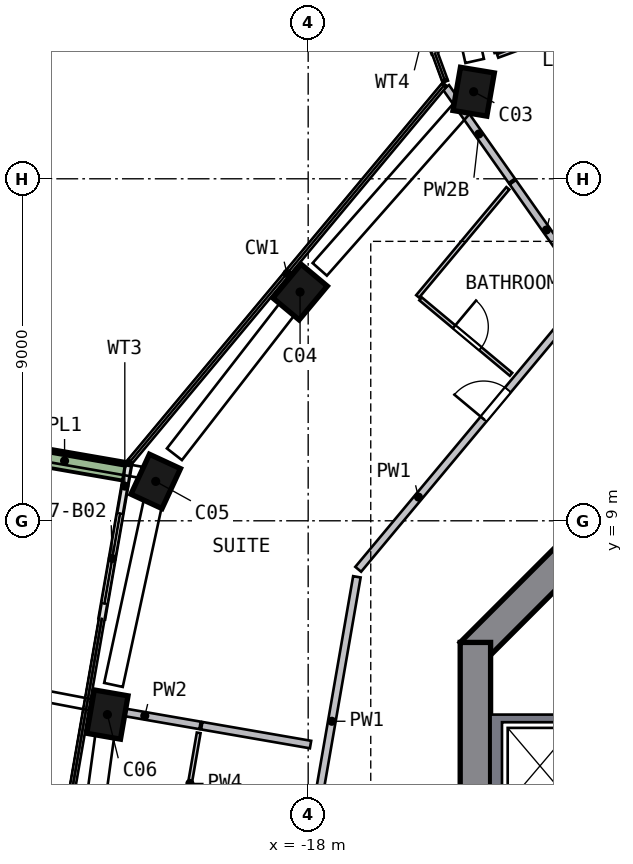
"""IFC4 building model, lengths in metres.
Left out: names, types, materials, properties, quantities, classifications, styles, units other than length and angle.
Written with IfcOpenShell. Run it as: python <this file> out.ifc"""

import sys

from ifc_helpers import new_model, si_unit, direction, frame, frame_2d, origin, origin_2d, place, context, subcontext, project, spatial, polyline, rectangle, outline, extrude, element, fill, save


model = new_model("IFC4")
c1 = context("Model", 3, precision=1e-05, world=origin(), true_north=direction((0.0, 1.0)))
c2 = subcontext(c1, "Body", "Model", "MODEL_VIEW")
j1 = project(units=[si_unit("LENGTHUNIT", "METRE"), si_unit("PLANEANGLEUNIT", "RADIAN")], contexts=[c1])
p1 = place(None, origin())
s1 = spatial("IfcSite", under=j1, at=p1, CompositionType="ELEMENT")
p2 = place(p1, origin())
s2 = spatial("IfcBuilding", under=s1, at=p2, CompositionType="ELEMENT")
p3 = place(p2, frame((0.0, 0.0, 115.0)))
s3 = spatial("IfcBuildingStorey", under=s2, at=p3, CompositionType="ELEMENT", Elevation=115.0)
p4 = place(p3, frame((-13.529, 20.37, 0.0), z_axis=(-0.0963115, -0.06514519, 0.993217096), x_axis=(0.163605987, 0.983247674, 0.080356042)))
e1 = element("IfcColumn", 1, at=p4, inside=s3, PredefinedType="COLUMN", context=c2, shape_type="SweptSolid", body=[
    extrude(rectangle(XDim=1.15, YDim=0.9, at=origin_2d()), origin(), (0.0, 0.0, 1.0), 3.212),
])
p5 = place(p3, frame((-18.127, 15.125, 0.0), z_axis=(-0.071258876, -0.086849132, 0.993669664), x_axis=(-0.636786768, -0.7628125, -0.112337447)))
e2 = element("IfcColumn", 2, at=p5, inside=s3, PredefinedType="COLUMN", context=c2, shape_type="SweptSolid", body=[
    extrude(rectangle(XDim=1.15, YDim=0.9, at=origin_2d()), origin(), (0.0, 0.0, 1.0), 3.21),
])
p6 = place(p3, frame((-21.955, 10.163, 0.0), z_axis=(-0.047440282, -0.104839983, 0.993356934), x_axis=(0.417189371, 0.90150539, 0.115069807)))
e3 = element("IfcColumn", 3, at=p6, inside=s3, PredefinedType="COLUMN", context=c2, shape_type="SweptSolid", body=[
    extrude(rectangle(XDim=1.15, YDim=0.9, at=origin_2d()), origin(), (0.0, 0.0, 1.0), 3.211),
])
p7 = place(p3, frame((-23.261, 4.035, 0.0), z_axis=(-0.018252096, -0.11080543, 0.993674503), x_axis=(-0.169817412, -0.979056669, -0.112294638)))
e4 = element("IfcColumn", 4, at=p7, inside=s3, PredefinedType="COLUMN", context=c2, shape_type="SweptSolid", body=[
    extrude(rectangle(XDim=1.15, YDim=0.9, at=origin_2d()), origin(), (0.0, 0.0, 1.0), 3.21),
])
p8 = place(p3, frame((-5.516, 13.717, 0.0), z_axis=(0.0, 0.0, 1.0), x_axis=(-0.707106781, -0.707106781, 0.0)))
e5 = element("IfcWall", 5, at=p8, inside=s3, PredefinedType="SHEAR", context=c2, shape_type="SweptSolid", body=[
    extrude(rectangle(XDim=11.598, YDim=0.8, at=frame_2d((5.799, 0.0))), origin(), (0.0, 0.0, 1.0), 3.5),
])
p9 = place(p3, frame((-13.6, 5.799, 0.0), z_axis=(0.0, 0.0, 1.0), x_axis=(0.0, -1.0, 0.0)))
e6 = element("IfcWall", 6, at=p9, inside=s3, PredefinedType="SHEAR", context=c2, shape_type="SweptSolid", body=[
    extrude(rectangle(XDim=11.598, YDim=0.8, at=frame_2d((5.799, 0.0))), origin(), (0.0, 0.0, 1.0), 3.5),
])
p10 = place(p9, frame((4.899, 0.0, 0.0)))
e7 = element("IfcOpeningElement", 7, at=p10, cuts=e6, PredefinedType="OPENING", context=c2, shape_type="SweptSolid", body=[
    extrude(rectangle(XDim=1.8, YDim=2.1, at=frame_2d((0.9, 1.05))), frame((0.0, 0.41, 0.0), z_axis=(0.0, -1.0, 0.0), x_axis=(1.0, 0.0, 0.0)), (0.0, 0.0, 1.0), 0.82),
])
p11 = place(p3, frame((-15.177, 22.698, 0.0), z_axis=(0.0, 0.0, 1.0), x_axis=(0.344671943, -0.938723203, 0.0)))
e8 = element("IfcWall", 8, at=p11, inside=s3, PredefinedType="SOLIDWALL", context=c2, shape_type="SweptSolid", body=[
    extrude(rectangle(XDim=1.478, YDim=0.15, at=frame_2d((0.739, 0.0))), origin(), (0.0, 0.0, 1.0), 2.425),
])
p12 = place(p3, frame((-22.734, 10.438, 0.0), z_axis=(0.0, 0.0, 1.0), x_axis=(-0.170877623, -0.98529226, 0.0)))
e9 = element("IfcWall", 9, at=p12, inside=s3, PredefinedType="SOLIDWALL", context=c2, shape_type="SweptSolid", body=[
    extrude(rectangle(XDim=4.068, YDim=0.15, at=frame_2d((2.034, 0.0))), origin(), (0.0, 0.0, 1.0), 2.425),
])
p13 = place(p12, frame((1.268, 0.0, 0.0)))
e10 = element("IfcOpeningElement", 10, at=p13, cuts=e9, PredefinedType="OPENING", context=c2, shape_type="SweptSolid", body=[
    extrude(rectangle(XDim=2.4, YDim=2.4, at=frame_2d((1.2, 1.2))), frame((0.0, 0.085, 0.0), z_axis=(0.0, -1.0, 0.0), x_axis=(1.0, 0.0, 0.0)), (0.0, 0.0, 1.0), 0.17),
])
p14 = place(p3, frame((-22.834, 10.304, 0.0), z_axis=(0.0, 0.0, 1.0), x_axis=(-0.985293977, 0.170867726, 0.0)))
e11 = element("IfcWall", 11, at=p14, inside=s3, PredefinedType="SOLIDWALL", context=c2, shape_type="SweptSolid", body=[
    extrude(rectangle(XDim=3.199, YDim=0.5, at=frame_2d((1.6, 0.0))), origin(), (0.0, 0.0, 1.0), 0.7),
])
p15 = place(p3, origin())
e12 = element("IfcWall", 12, at=p15, inside=s3, PredefinedType="SOLIDWALL", context=c2, shape_type="SweptSolid", body=[
    extrude(outline(polyline([(-13.2, 3.9), (-10.9, 3.9), (-10.9, 3.7), (-12.9, 3.7), (-12.9, 1.4), (-10.9, 1.4), (-10.9, 1.2), (-13.2, 1.2), (-13.2, 3.9)])), origin(), (0.0, 0.0, 1.0), 3.19),
])
p16 = place(p3, frame((-18.276, -1.456, 0.0), z_axis=(0.0, 0.0, 1.0), x_axis=(0.170875476, 0.985292633, 0.0)))
e13 = element("IfcWall", 13, at=p16, inside=s3, PredefinedType="SOLIDWALL", context=c2, shape_type="SweptSolid", body=[
    extrude(rectangle(XDim=9.115, YDim=0.2, at=frame_2d((4.558, 0.0))), origin(), (0.0, 0.0, 1.0), 3.19),
])
p17 = place(p16, frame((0.2, 0.0, 0.0)))
e14 = element("IfcOpeningElement", 14, at=p17, cuts=e13, PredefinedType="OPENING", context=c2, shape_type="SweptSolid", body=[
    extrude(rectangle(XDim=1.0, YDim=2.1, at=frame_2d((0.5, 1.05))), frame((0.0, 0.11, 0.0), z_axis=(0.0, -1.0, 0.0), x_axis=(1.0, 0.0, 0.0)), (0.0, 0.0, 1.0), 0.22),
])
p18 = place(p3, frame((-16.684, 7.724, 0.0), z_axis=(0.0, 0.0, 1.0), x_axis=(0.640650848, 0.767832332, 0.0)))
e15 = element("IfcWall", 15, at=p18, inside=s3, PredefinedType="SOLIDWALL", context=c2, shape_type="SweptSolid", body=[
    extrude(rectangle(XDim=9.316, YDim=0.2, at=frame_2d((4.658, 0.0))), origin(), (0.0, 0.0, 1.0), 3.19),
])
p19 = place(p18, frame((5.15, 0.0, 0.0)))
e16 = element("IfcOpeningElement", 16, at=p19, cuts=e15, PredefinedType="OPENING", context=c2, shape_type="SweptSolid", body=[
    extrude(rectangle(XDim=1.0, YDim=2.1, at=frame_2d((0.5, 1.05))), frame((0.0, 0.11, 0.0), z_axis=(0.0, -1.0, 0.0), x_axis=(1.0, 0.0, 0.0)), (0.0, 0.0, 1.0), 0.22),
])
p20 = place(p3, frame((-20.845, 3.615, 0.0), z_axis=(0.0, 0.0, 1.0), x_axis=(-0.985279058, 0.170953732, 0.0)))
e17 = element("IfcWall", 17, at=p20, inside=s3, PredefinedType="SOLIDWALL", context=c2, shape_type="SweptSolid", body=[
    extrude(rectangle(XDim=2.952, YDim=0.2, at=frame_2d((1.476, 0.0))), origin(), (0.0, 0.0, 1.0), 3.19),
])
p21 = place(p3, frame((-17.938, 3.111, 0.0), z_axis=(0.0, 0.0, 1.0), x_axis=(-0.985293685, 0.170869407, 0.0)))
e18 = element("IfcWall", 18, at=p21, inside=s3, PredefinedType="SOLIDWALL", context=c2, shape_type="SweptSolid", body=[
    extrude(rectangle(XDim=2.905, YDim=0.2, at=frame_2d((1.452, 0.0))), origin(), (0.0, 0.0, 1.0), 3.19),
])
p22 = place(p3, frame((-12.642, 17.947, 0.0), z_axis=(0.0, 0.0, 1.0), x_axis=(-0.575919056, 0.817506723, 0.0)))
e19 = element("IfcWall", 19, at=p22, inside=s3, PredefinedType="SOLIDWALL", context=c2, shape_type="SweptSolid", body=[
    extrude(rectangle(XDim=3.011, YDim=0.2, at=frame_2d((1.506, 0.0))), origin(), (0.0, 0.0, 1.0), 2.69),
])
p23 = place(p3, frame((-10.844, 15.396, 0.0), z_axis=(0.0, 0.0, 1.0), x_axis=(-0.575863088, 0.817546148, 0.0)))
e20 = element("IfcWall", 20, at=p23, inside=s3, PredefinedType="SOLIDWALL", context=c2, shape_type="SweptSolid", body=[
    extrude(rectangle(XDim=3.075, YDim=0.2, at=frame_2d((1.538, 0.0))), origin(), (0.0, 0.0, 1.0), 3.19),
])
p24 = place(p3, frame((-21.343, 0.759, 0.0), z_axis=(0.0, 0.0, 1.0), x_axis=(0.170993898, 0.985272088, 0.0)))
e21 = element("IfcWall", 21, at=p24, inside=s3, PredefinedType="PARTITIONING", context=c2, shape_type="SweptSolid", body=[
    extrude(rectangle(XDim=2.7, YDim=0.1, at=frame_2d((1.35, 0.0))), origin(), (0.0, 0.0, 1.0), 3.19),
])
p25 = place(p3, frame((-15.12, 14.905, 0.0), z_axis=(0.0, 0.0, 1.0), x_axis=(0.640638089, 0.767842978, 0.0)))
e22 = element("IfcWall", 22, at=p25, inside=s3, PredefinedType="PARTITIONING", context=c2, shape_type="SweptSolid", body=[
    extrude(rectangle(XDim=3.704, YDim=0.1, at=frame_2d((1.852, 0.0))), origin(), (0.0, 0.0, 1.0), 3.19),
])
p26 = place(p3, frame((-15.043, 14.841, 0.0), z_axis=(0.0, 0.0, 1.0), x_axis=(0.767833833, -0.64064905, 0.0)))
e23 = element("IfcWall", 23, at=p26, inside=s3, PredefinedType="PARTITIONING", context=c2, shape_type="SweptSolid", body=[
    extrude(rectangle(XDim=3.1, YDim=0.1, at=frame_2d((1.55, 0.0))), origin(), (0.0, 0.0, 1.0), 3.19),
])
p27 = place(p26, frame((1.15, 0.0, 0.0)))
e24 = element("IfcOpeningElement", 24, at=p27, cuts=e23, PredefinedType="OPENING", context=c2, shape_type="SweptSolid", body=[
    extrude(rectangle(XDim=0.9, YDim=2.1, at=frame_2d((0.45, 1.05))), frame((0.0, 0.06, 0.0), z_axis=(0.0, -1.0, 0.0), x_axis=(1.0, 0.0, 0.0)), (0.0, 0.0, 1.0), 0.12),
])
p28 = place(p3, frame((-13.05, 21.327, 0.0), z_axis=(0.0, 0.0, 1.0), x_axis=(-0.344662518, 0.938726663, 0.0)))
e25 = element("IfcWall", 25, at=p28, inside=s3, PredefinedType="PARTITIONING", context=c2, shape_type="SweptSolid", body=[
    extrude(rectangle(XDim=2.55, YDim=0.1, at=frame_2d((1.275, 0.0))), origin(), (0.0, 0.0, 1.0), 3.19),
])
p29 = place(p3, frame((-13.015, 21.233, 0.0), z_axis=(0.0, 0.0, 1.0), x_axis=(0.938731564, 0.34464917, 0.0)))
e26 = element("IfcWall", 26, at=p29, inside=s3, PredefinedType="PARTITIONING", context=c2, shape_type="SweptSolid", body=[
    extrude(rectangle(XDim=3.6, YDim=0.1, at=frame_2d((1.8, 0.0))), origin(), (0.0, 0.0, 1.0), 3.19),
])
p30 = place(p29, frame((1.4, 0.0, 0.0)))
e27 = element("IfcOpeningElement", 27, at=p30, cuts=e26, PredefinedType="OPENING", context=c2, shape_type="SweptSolid", body=[
    extrude(rectangle(XDim=1.0, YDim=2.1, at=frame_2d((0.5, 1.05))), frame((0.0, 0.06, 0.0), z_axis=(0.0, -1.0, 0.0), x_axis=(1.0, 0.0, 0.0)), (0.0, 0.0, 1.0), 0.12),
])
p31 = place(p13, origin())
e28 = element("IfcDoor", 28, at=p31, inside=s3, OperationType="SLIDING_TO_LEFT", PredefinedType="DOOR", context=c2, shape_type="SweptSolid", body=[
    extrude(rectangle(XDim=2.4, YDim=2.4, at=frame_2d((1.2, 1.2))), frame((0.0, 0.025, 0.0), z_axis=(0.0, -1.0, 0.0), x_axis=(1.0, 0.0, 0.0)), (0.0, 0.0, 1.0), 0.05),
])
fill(e10, e28)
p32 = place(p19, origin())
e29 = element("IfcDoor", 29, at=p32, inside=s3, OperationType="SINGLE_SWING_LEFT", PredefinedType="DOOR", context=c2, shape_type="SweptSolid", body=[
    extrude(rectangle(XDim=1.0, YDim=2.1, at=frame_2d((0.5, 1.05))), frame((0.0, 0.025, 0.0), z_axis=(0.0, -1.0, 0.0), x_axis=(1.0, 0.0, 0.0)), (0.0, 0.0, 1.0), 0.05),
])
fill(e16, e29)
p33 = place(p27, origin())
e30 = element("IfcDoor", 30, at=p33, inside=s3, OperationType="SINGLE_SWING_LEFT", PredefinedType="DOOR", context=c2, shape_type="SweptSolid", body=[
    extrude(rectangle(XDim=0.9, YDim=2.1, at=frame_2d((0.45, 1.05))), frame((0.0, 0.025, 0.0), z_axis=(0.0, -1.0, 0.0), x_axis=(1.0, 0.0, 0.0)), (0.0, 0.0, 1.0), 0.05),
])
fill(e24, e30)
save(model, sys.argv[1])
